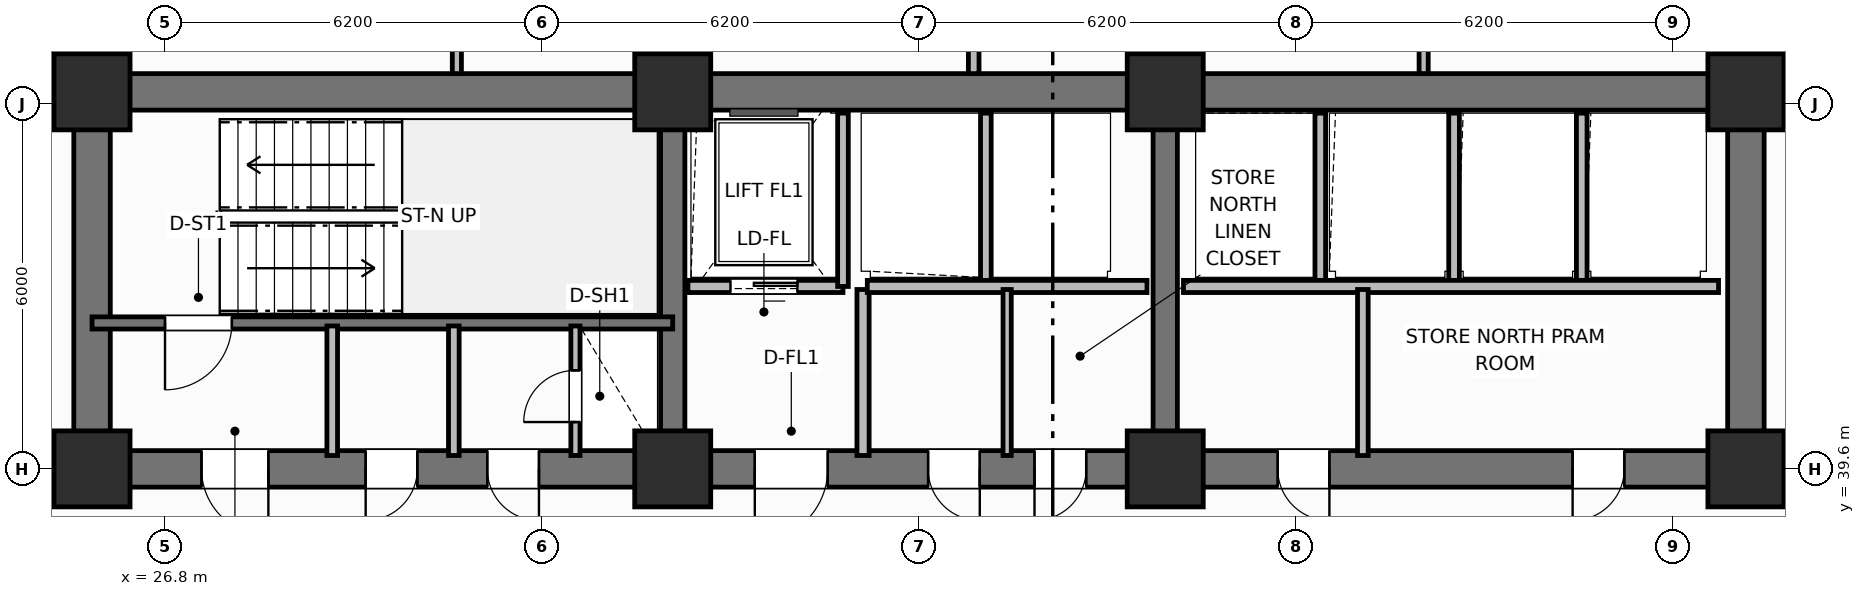
"""IFC4 building model, lengths in metres.
Left out: names, types, materials, properties, quantities, classifications, styles, units other than length and angle.
Written with IfcOpenShell. Run it as: python <this file> out.ifc"""

import sys

from ifc_helpers import new_model, si_unit, direction, frame, frame_2d, origin, origin_2d, place, context, subcontext, project, spatial, rectangle, extrude, element, fill, save


model = new_model("IFC4")
c1 = context("Model", 3, precision=1e-05, world=origin(), true_north=direction((0.0, 1.0)))
c2 = subcontext(c1, "Body", "Model", "MODEL_VIEW")
j1 = project(units=[si_unit("LENGTHUNIT", "METRE"), si_unit("PLANEANGLEUNIT", "RADIAN")], contexts=[c1])
p1 = place(None, origin())
s1 = spatial("IfcSite", under=j1, at=p1, CompositionType="ELEMENT")
p2 = place(p1, origin())
s2 = spatial("IfcBuilding", under=s1, at=p2, CompositionType="ELEMENT")
p3 = place(p2, frame((0.0, 0.0, 39.9)))
s3 = spatial("IfcBuildingStorey", under=s2, at=p3, CompositionType="ELEMENT", Elevation=39.9)
p4 = place(p3, frame((25.6, 45.8, 0.0), z_axis=(0.0, 0.0, 1.0), x_axis=(1.0, 0.0, 0.0)))
e1 = element("IfcWall", 1, at=p4, inside=s3, PredefinedType="SHEAR", context=c2, shape_type="SweptSolid", body=[
    extrude(rectangle(XDim=27.2, YDim=0.6, at=frame_2d((13.6, 0.0))), origin(), (0.0, 0.0, 1.0), 3.7),
])
for number, where, z_axis, x_axis in (
    (2, (25.6, 39.9, 0.0), (0.0, 0.0, 1.0), (0.0, 1.0, 0.0)),
    (3, (52.8, 39.9, 0.0), (0.0, 0.0, 1.0), (0.0, 1.0, 0.0)),
):
    element("IfcWall", number, at=place(p3, frame(where, z_axis=z_axis, x_axis=x_axis)), inside=s3, PredefinedType="SHEAR", context=c2, shape_type="SweptSolid", body=[
        extrude(rectangle(XDim=5.6, YDim=0.6, at=frame_2d((2.8, 0.0))), origin(), (0.0, 0.0, 1.0), 3.7),
    ])
p5 = place(p3, frame((52.8, 39.6, 0.0), z_axis=(0.0, 0.0, 1.0), x_axis=(-1.0, 0.0, 0.0)))
e4 = element("IfcWall", 4, at=p5, inside=s3, PredefinedType="SHEAR", context=c2, shape_type="SweptSolid", body=[
    extrude(rectangle(XDim=27.2, YDim=0.6, at=frame_2d((13.6, 0.0))), origin(), (0.0, 0.0, 1.0), 3.7),
])
p6 = place(p5, frame((24.3, 0.0, 0.0)))
e5 = element("IfcOpeningElement", 5, at=p6, cuts=e4, PredefinedType="OPENING", context=c2, shape_type="SweptSolid", body=[
    extrude(rectangle(XDim=1.1, YDim=2.15, at=frame_2d((0.55, 1.075))), frame((0.0, 0.31, 0.0), z_axis=(0.0, -1.0, 0.0), x_axis=(1.0, 0.0, 0.0)), (0.0, 0.0, 1.0), 0.62),
])
p7 = place(p5, frame((21.85, 0.0, 0.0)))
e6 = element("IfcOpeningElement", 6, at=p7, cuts=e4, PredefinedType="OPENING", context=c2, shape_type="SweptSolid", body=[
    extrude(rectangle(XDim=0.85, YDim=2.1, at=frame_2d((0.425, 1.05))), frame((0.0, 0.31, 0.0), z_axis=(0.0, -1.0, 0.0), x_axis=(1.0, 0.0, 0.0)), (0.0, 0.0, 1.0), 0.62),
])
p8 = place(p5, frame((19.85, 0.0, 0.0)))
e7 = element("IfcOpeningElement", 7, at=p8, cuts=e4, PredefinedType="OPENING", context=c2, shape_type="SweptSolid", body=[
    extrude(rectangle(XDim=0.85, YDim=2.1, at=frame_2d((0.425, 1.05))), frame((0.0, 0.31, 0.0), z_axis=(0.0, -1.0, 0.0), x_axis=(1.0, 0.0, 0.0)), (0.0, 0.0, 1.0), 0.62),
])
p9 = place(p5, frame((15.1, 0.0, 0.0)))
e8 = element("IfcOpeningElement", 8, at=p9, cuts=e4, PredefinedType="OPENING", context=c2, shape_type="SweptSolid", body=[
    extrude(rectangle(XDim=1.2, YDim=2.15, at=frame_2d((0.6, 1.075))), frame((0.0, 0.31, 0.0), z_axis=(0.0, -1.0, 0.0), x_axis=(1.0, 0.0, 0.0)), (0.0, 0.0, 1.0), 0.62),
])
p10 = place(p5, frame((12.6, 0.0, 0.0)))
e9 = element("IfcOpeningElement", 9, at=p10, cuts=e4, PredefinedType="OPENING", context=c2, shape_type="SweptSolid", body=[
    extrude(rectangle(XDim=0.85, YDim=2.1, at=frame_2d((0.425, 1.05))), frame((0.0, 0.31, 0.0), z_axis=(0.0, -1.0, 0.0), x_axis=(1.0, 0.0, 0.0)), (0.0, 0.0, 1.0), 0.62),
])
p11 = place(p5, frame((10.85, 0.0, 0.0)))
e10 = element("IfcOpeningElement", 10, at=p11, cuts=e4, PredefinedType="OPENING", context=c2, shape_type="SweptSolid", body=[
    extrude(rectangle(XDim=0.85, YDim=2.1, at=frame_2d((0.425, 1.05))), frame((0.0, 0.31, 0.0), z_axis=(0.0, -1.0, 0.0), x_axis=(1.0, 0.0, 0.0)), (0.0, 0.0, 1.0), 0.62),
])
p12 = place(p5, frame((6.85, 0.0, 0.0)))
e11 = element("IfcOpeningElement", 11, at=p12, cuts=e4, PredefinedType="OPENING", context=c2, shape_type="SweptSolid", body=[
    extrude(rectangle(XDim=0.85, YDim=2.1, at=frame_2d((0.425, 1.05))), frame((0.0, 0.31, 0.0), z_axis=(0.0, -1.0, 0.0), x_axis=(1.0, 0.0, 0.0)), (0.0, 0.0, 1.0), 0.62),
])
p13 = place(p5, frame((2.0, 0.0, 0.0)))
e12 = element("IfcOpeningElement", 12, at=p13, cuts=e4, PredefinedType="OPENING", context=c2, shape_type="SweptSolid", body=[
    extrude(rectangle(XDim=0.85, YDim=2.1, at=frame_2d((0.425, 1.05))), frame((0.0, 0.31, 0.0), z_axis=(0.0, -1.0, 0.0), x_axis=(1.0, 0.0, 0.0)), (0.0, 0.0, 1.0), 0.62),
])
for number, where, z_axis, x_axis in (
    (13, (35.15, 39.9, 0.0), (0.0, 0.0, 1.0), (0.0, 1.0, 0.0)),
    (14, (43.25, 39.9, 0.0), (0.0, 0.0, 1.0), (0.0, 1.0, 0.0)),
):
    element("IfcWall", number, at=place(p3, frame(where, z_axis=z_axis, x_axis=x_axis)), inside=s3, PredefinedType="SHEAR", context=c2, shape_type="SweptSolid", body=[
        extrude(rectangle(XDim=5.6, YDim=0.4, at=frame_2d((2.8, 0.0))), origin(), (0.0, 0.0, 1.0), 3.7),
    ])
for number, where, z_axis, x_axis in (
    (15, (25.6, 39.6, 0.0), (0.0, 0.0, 1.0), (1.0, 0.0, 0.0)),
    (16, (25.6, 45.8, 0.0), (0.0, 0.0, 1.0), (1.0, 0.0, 0.0)),
    (17, (35.15, 39.6, 0.0), (0.0, 0.0, 1.0), (1.0, 0.0, 0.0)),
    (18, (35.15, 45.8, 0.0), (0.0, 0.0, 1.0), (1.0, 0.0, 0.0)),
    (19, (43.25, 39.6, 0.0), (0.0, 0.0, 1.0), (1.0, 0.0, 0.0)),
    (20, (43.25, 45.8, 0.0), (0.0, 0.0, 1.0), (1.0, 0.0, 0.0)),
    (21, (52.8, 39.6, 0.0), (0.0, 0.0, 1.0), (1.0, 0.0, 0.0)),
    (22, (52.8, 45.8, 0.0), (0.0, 0.0, 1.0), (1.0, 0.0, 0.0)),
):
    element("IfcColumn", number, at=place(p3, frame(where, z_axis=z_axis, x_axis=x_axis)), inside=s3, PredefinedType="COLUMN", context=c2, shape_type="SweptSolid", body=[
        extrude(rectangle(XDim=1.25, YDim=1.25, at=origin_2d()), origin(), (0.0, 0.0, 1.0), 3.7),
    ])
p14 = place(p3, frame((35.15, 42.0, 0.0), z_axis=(0.0, 0.0, 1.0), x_axis=(-1.0, 0.0, 0.0)))
e23 = element("IfcWall", 23, at=p14, inside=s3, PredefinedType="SHEAR", context=c2, shape_type="SweptSolid", body=[
    extrude(rectangle(XDim=9.55, YDim=0.2, at=frame_2d((4.775, 0.0))), origin(), (0.0, 0.0, 1.0), 3.7),
])
p15 = place(p14, frame((7.25, 0.0, 0.0)))
e24 = element("IfcOpeningElement", 24, at=p15, cuts=e23, PredefinedType="OPENING", context=c2, shape_type="SweptSolid", body=[
    extrude(rectangle(XDim=1.1, YDim=2.15, at=frame_2d((0.55, 1.075))), frame((0.0, 0.11, 0.0), z_axis=(0.0, -1.0, 0.0), x_axis=(1.0, 0.0, 0.0)), (0.0, 0.0, 1.0), 0.22),
])
p16 = place(p3, frame((33.55, 39.82, 0.0), z_axis=(0.0, 0.0, 1.0), x_axis=(0.0, 1.0, 0.0)))
e25 = element("IfcWall", 25, at=p16, inside=s3, PredefinedType="PARTITIONING", context=c2, shape_type="SweptSolid", body=[
    extrude(rectangle(XDim=2.13, YDim=0.15, at=frame_2d((1.065, 0.0))), origin(), (0.0, 0.0, 1.0), 2.53),
])
p17 = place(p16, frame((0.55, 0.0, 0.0)))
e26 = element("IfcOpeningElement", 26, at=p17, cuts=e25, PredefinedType="OPENING", context=c2, shape_type="SweptSolid", body=[
    extrude(rectangle(XDim=0.85, YDim=2.05, at=frame_2d((0.425, 1.025))), frame((0.0, 0.085, 0.0), z_axis=(0.0, -1.0, 0.0), x_axis=(1.0, 0.0, 0.0)), (0.0, 0.0, 1.0), 0.17),
])
for number, where, z_axis, x_axis in (
    (27, (29.55, 39.82, 0.0), (0.0, 0.0, 1.0), (0.0, 1.0, 0.0)),
    (28, (31.55, 39.82, 0.0), (0.0, 0.0, 1.0), (0.0, 1.0, 0.0)),
):
    element("IfcWall", number, at=place(p3, frame(where, z_axis=z_axis, x_axis=x_axis)), inside=s3, PredefinedType="PARTITIONING", context=c2, shape_type="SweptSolid", body=[
        extrude(rectangle(XDim=2.13, YDim=0.175, at=frame_2d((1.065, 0.0))), origin(), (0.0, 0.0, 1.0), 2.53),
    ])
p18 = place(p3, frame((37.95, 42.6, 0.0), z_axis=(0.0, 0.0, 1.0), x_axis=(-1.0, 0.0, 0.0)))
e29 = element("IfcWall", 29, at=p18, inside=s3, PredefinedType="PARTITIONING", context=c2, shape_type="SweptSolid", body=[
    extrude(rectangle(XDim=2.55, YDim=0.2, at=frame_2d((1.275, 0.0))), origin(), (0.0, 0.0, 1.0), 2.3),
])
p19 = place(p18, frame((0.75, 0.0, 0.0)))
e30 = element("IfcOpeningElement", 30, at=p19, cuts=e29, PredefinedType="OPENING", context=c2, shape_type="SweptSolid", body=[
    extrude(rectangle(XDim=1.1, YDim=2.15, at=frame_2d((0.55, 1.075))), frame((0.0, 0.11, 0.0), z_axis=(0.0, -1.0, 0.0), x_axis=(1.0, 0.0, 0.0)), (0.0, 0.0, 1.0), 0.22),
])
p20 = place(p3, frame((37.95, 42.6, 0.0), z_axis=(0.0, 0.0, 1.0), x_axis=(0.0, 1.0, 0.0)))
e31 = element("IfcWall", 31, at=p20, inside=s3, PredefinedType="PARTITIONING", context=c2, shape_type="SweptSolid", body=[
    extrude(rectangle(XDim=2.85, YDim=0.175, at=frame_2d((1.425, 0.0))), origin(), (0.0, 0.0, 1.0), 2.53),
])
p21 = place(p3, frame((38.28, 39.82, 0.0), z_axis=(0.0, 0.0, 1.0), x_axis=(0.0, 1.0, 0.0)))
e32 = element("IfcWall", 32, at=p21, inside=s3, PredefinedType="PARTITIONING", context=c2, shape_type="SweptSolid", body=[
    extrude(rectangle(XDim=2.73, YDim=0.2, at=frame_2d((1.365, 0.0))), origin(), (0.0, 0.0, 1.0), 2.53),
])
p22 = place(p3, frame((40.3, 42.65, 0.0), z_axis=(0.0, 0.0, 1.0), x_axis=(0.0, 1.0, 0.0)))
e33 = element("IfcWall", 33, at=p22, inside=s3, PredefinedType="PARTITIONING", context=c2, shape_type="SweptSolid", body=[
    extrude(rectangle(XDim=2.8, YDim=0.175, at=frame_2d((1.4, 0.0))), origin(), (0.0, 0.0, 1.0), 2.53),
])
p23 = place(p3, frame((42.95, 42.6, 0.0), z_axis=(0.0, 0.0, 1.0), x_axis=(-1.0, 0.0, 0.0)))
e34 = element("IfcWall", 34, at=p23, inside=s3, PredefinedType="PARTITIONING", context=c2, shape_type="SweptSolid", body=[
    extrude(rectangle(XDim=4.6, YDim=0.2, at=frame_2d((2.3, 0.0))), origin(), (0.0, 0.0, 1.0), 2.3),
])
p24 = place(p3, frame((40.65, 39.82, 0.0), z_axis=(0.0, 0.0, 1.0), x_axis=(0.0, 1.0, 0.0)))
e35 = element("IfcWall", 35, at=p24, inside=s3, PredefinedType="PARTITIONING", context=c2, shape_type="SweptSolid", body=[
    extrude(rectangle(XDim=2.73, YDim=0.135, at=frame_2d((1.365, 0.0))), origin(), (0.0, 0.0, 1.0), 2.53),
])
for number, where, z_axis, x_axis in (
    (36, (45.8, 42.65, 0.0), (0.0, 0.0, 1.0), (0.0, 1.0, 0.0)),
    (37, (48.0, 42.65, 0.0), (0.0, 0.0, 1.0), (0.0, 1.0, 0.0)),
    (38, (50.1, 42.65, 0.0), (0.0, 0.0, 1.0), (0.0, 1.0, 0.0)),
):
    element("IfcWall", number, at=place(p3, frame(where, z_axis=z_axis, x_axis=x_axis)), inside=s3, PredefinedType="PARTITIONING", context=c2, shape_type="SweptSolid", body=[
        extrude(rectangle(XDim=2.8, YDim=0.175, at=frame_2d((1.4, 0.0))), origin(), (0.0, 0.0, 1.0), 2.53),
    ])
p25 = place(p3, frame((52.35, 42.6, 0.0), z_axis=(0.0, 0.0, 1.0), x_axis=(-1.0, 0.0, 0.0)))
e39 = element("IfcWall", 39, at=p25, inside=s3, PredefinedType="PARTITIONING", context=c2, shape_type="SweptSolid", body=[
    extrude(rectangle(XDim=8.8, YDim=0.2, at=frame_2d((4.4, 0.0))), origin(), (0.0, 0.0, 1.0), 2.53),
])
p26 = place(p3, frame((46.5, 39.82, 0.0), z_axis=(0.0, 0.0, 1.0), x_axis=(0.0, 1.0, 0.0)))
e40 = element("IfcWall", 40, at=p26, inside=s3, PredefinedType="PARTITIONING", context=c2, shape_type="SweptSolid", body=[
    extrude(rectangle(XDim=2.73, YDim=0.175, at=frame_2d((1.365, 0.0))), origin(), (0.0, 0.0, 1.0), 2.53),
])
p27 = place(p3, frame((31.6, 46.1, 0.0), z_axis=(0.0, 0.0, 1.0), x_axis=(0.0, 1.0, 0.0)))
e41 = element("IfcWall", 41, at=p27, inside=s3, PredefinedType="PARTITIONING", context=c2, shape_type="SweptSolid", body=[
    extrude(rectangle(XDim=5.33, YDim=0.15, at=frame_2d((2.665, 0.0))), origin(), (0.0, 0.0, 1.0), 2.53),
])
p28 = place(p27, frame((0.85, 0.0, 0.0)))
e42 = element("IfcOpeningElement", 42, at=p28, cuts=e41, PredefinedType="OPENING", context=c2, shape_type="SweptSolid", body=[
    extrude(rectangle(XDim=0.9, YDim=2.1, at=frame_2d((0.45, 1.05))), frame((0.0, 0.085, 0.0), z_axis=(0.0, -1.0, 0.0), x_axis=(1.0, 0.0, 0.0)), (0.0, 0.0, 1.0), 0.17),
])
p29 = place(p3, frame((40.1, 46.1, 0.0), z_axis=(0.0, 0.0, 1.0), x_axis=(0.0, 1.0, 0.0)))
e43 = element("IfcWall", 43, at=p29, inside=s3, PredefinedType="PARTITIONING", context=c2, shape_type="SweptSolid", body=[
    extrude(rectangle(XDim=5.33, YDim=0.175, at=frame_2d((2.665, 0.0))), origin(), (0.0, 0.0, 1.0), 2.53),
])
p30 = place(p3, frame((47.5, 46.1, 0.0), z_axis=(0.0, 0.0, 1.0), x_axis=(0.0, 1.0, 0.0)))
e44 = element("IfcWall", 44, at=p30, inside=s3, PredefinedType="PARTITIONING", context=c2, shape_type="SweptSolid", body=[
    extrude(rectangle(XDim=5.33, YDim=0.15, at=frame_2d((2.665, 0.0))), origin(), (0.0, 0.0, 1.0), 2.53),
])
p31 = place(p30, frame((0.85, 0.0, 0.0)))
e45 = element("IfcOpeningElement", 45, at=p31, cuts=e44, PredefinedType="OPENING", context=c2, shape_type="SweptSolid", body=[
    extrude(rectangle(XDim=0.9, YDim=2.1, at=frame_2d((0.45, 1.05))), frame((0.0, 0.085, 0.0), z_axis=(0.0, -1.0, 0.0), x_axis=(1.0, 0.0, 0.0)), (0.0, 0.0, 1.0), 0.17),
])
p32 = place(p3, frame((25.4, 46.1, 0.0), z_axis=(0.0, 0.0, 1.0), x_axis=(0.0, 1.0, 0.0)))
e46 = element("IfcWall", 46, at=p32, inside=s3, PredefinedType="PARTITIONING", context=c2, shape_type="SweptSolid", body=[
    extrude(rectangle(XDim=4.38, YDim=0.2, at=frame_2d((2.19, 0.0))), origin(), (0.0, 0.0, 1.0), 2.53),
])
p33 = place(p32, frame((1.05, 0.0, 0.0)))
e47 = element("IfcOpeningElement", 47, at=p33, cuts=e46, PredefinedType="OPENING", context=c2, shape_type="SweptSolid", body=[
    extrude(rectangle(XDim=0.9, YDim=2.1, at=frame_2d((0.45, 1.05))), frame((0.0, 0.11, 0.0), z_axis=(0.0, -1.0, 0.0), x_axis=(1.0, 0.0, 0.0)), (0.0, 0.0, 1.0), 0.22),
])
p34 = place(p3, frame((53.0, 46.1, 0.0), z_axis=(0.0, 0.0, 1.0), x_axis=(0.0, 1.0, 0.0)))
e48 = element("IfcWall", 48, at=p34, inside=s3, PredefinedType="PARTITIONING", context=c2, shape_type="SweptSolid", body=[
    extrude(rectangle(XDim=4.38, YDim=0.2, at=frame_2d((2.19, 0.0))), origin(), (0.0, 0.0, 1.0), 2.53),
])
p35 = place(p34, frame((1.05, 0.0, 0.0)))
e49 = element("IfcOpeningElement", 49, at=p35, cuts=e48, PredefinedType="OPENING", context=c2, shape_type="SweptSolid", body=[
    extrude(rectangle(XDim=0.9, YDim=2.1, at=frame_2d((0.45, 1.05))), frame((0.0, 0.11, 0.0), z_axis=(0.0, -1.0, 0.0), x_axis=(1.0, 0.0, 0.0)), (0.0, 0.0, 1.0), 0.22),
])
p36 = place(p15, origin())
e50 = element("IfcDoor", 50, at=p36, inside=s3, OperationType="SINGLE_SWING_RIGHT", PredefinedType="DOOR", context=c2, shape_type="SweptSolid", body=[
    extrude(rectangle(XDim=1.1, YDim=2.15, at=frame_2d((0.55, 1.075))), frame((0.0, 0.025, 0.0), z_axis=(0.0, -1.0, 0.0), x_axis=(1.0, 0.0, 0.0)), (0.0, 0.0, 1.0), 0.05),
])
fill(e24, e50)
p37 = place(p17, origin())
e51 = element("IfcDoor", 51, at=p37, inside=s3, OperationType="SINGLE_SWING_LEFT", PredefinedType="TRAPDOOR", context=c2, shape_type="SweptSolid", body=[
    extrude(rectangle(XDim=0.85, YDim=2.05, at=frame_2d((0.425, 1.025))), frame((0.0, 0.025, 0.0), z_axis=(0.0, -1.0, 0.0), x_axis=(1.0, 0.0, 0.0)), (0.0, 0.0, 1.0), 0.05),
])
fill(e26, e51)
p38 = place(p19, origin())
e52 = element("IfcDoor", 52, at=p38, inside=s3, OperationType="SLIDING_TO_LEFT", PredefinedType="DOOR", context=c2, shape_type="SweptSolid", body=[
    extrude(rectangle(XDim=1.1, YDim=2.15, at=frame_2d((0.55, 1.075))), frame((0.0, 0.025, 0.0), z_axis=(0.0, -1.0, 0.0), x_axis=(1.0, 0.0, 0.0)), (0.0, 0.0, 1.0), 0.05),
])
fill(e30, e52)
p39 = place(p6, origin())
e53 = element("IfcDoor", 53, at=p39, inside=s3, OperationType="SINGLE_SWING_LEFT", PredefinedType="DOOR", context=c2, shape_type="SweptSolid", body=[
    extrude(rectangle(XDim=1.1, YDim=2.15, at=frame_2d((0.55, 1.075))), frame((0.0, 0.025, 0.0), z_axis=(0.0, -1.0, 0.0), x_axis=(1.0, 0.0, 0.0)), (0.0, 0.0, 1.0), 0.05),
])
fill(e5, e53)
p40 = place(p7, origin())
e54 = element("IfcDoor", 54, at=p40, inside=s3, OperationType="SINGLE_SWING_RIGHT", PredefinedType="DOOR", context=c2, shape_type="SweptSolid", body=[
    extrude(rectangle(XDim=0.85, YDim=2.1, at=frame_2d((0.425, 1.05))), frame((0.0, 0.025, 0.0), z_axis=(0.0, -1.0, 0.0), x_axis=(1.0, 0.0, 0.0)), (0.0, 0.0, 1.0), 0.05),
])
fill(e6, e54)
p41 = place(p8, origin())
e55 = element("IfcDoor", 55, at=p41, inside=s3, OperationType="SINGLE_SWING_LEFT", PredefinedType="DOOR", context=c2, shape_type="SweptSolid", body=[
    extrude(rectangle(XDim=0.85, YDim=2.1, at=frame_2d((0.425, 1.05))), frame((0.0, 0.025, 0.0), z_axis=(0.0, -1.0, 0.0), x_axis=(1.0, 0.0, 0.0)), (0.0, 0.0, 1.0), 0.05),
])
fill(e7, e55)
p42 = place(p9, origin())
e56 = element("IfcDoor", 56, at=p42, inside=s3, OperationType="SINGLE_SWING_RIGHT", PredefinedType="DOOR", context=c2, shape_type="SweptSolid", body=[
    extrude(rectangle(XDim=1.2, YDim=2.15, at=frame_2d((0.6, 1.075))), frame((0.0, 0.025, 0.0), z_axis=(0.0, -1.0, 0.0), x_axis=(1.0, 0.0, 0.0)), (0.0, 0.0, 1.0), 0.05),
])
fill(e8, e56)
p43 = place(p10, origin())
e57 = element("IfcDoor", 57, at=p43, inside=s3, OperationType="SINGLE_SWING_LEFT", PredefinedType="DOOR", context=c2, shape_type="SweptSolid", body=[
    extrude(rectangle(XDim=0.85, YDim=2.1, at=frame_2d((0.425, 1.05))), frame((0.0, 0.025, 0.0), z_axis=(0.0, -1.0, 0.0), x_axis=(1.0, 0.0, 0.0)), (0.0, 0.0, 1.0), 0.05),
])
fill(e9, e57)
p44 = place(p11, origin())
e58 = element("IfcDoor", 58, at=p44, inside=s3, OperationType="SINGLE_SWING_RIGHT", PredefinedType="DOOR", context=c2, shape_type="SweptSolid", body=[
    extrude(rectangle(XDim=0.85, YDim=2.1, at=frame_2d((0.425, 1.05))), frame((0.0, 0.025, 0.0), z_axis=(0.0, -1.0, 0.0), x_axis=(1.0, 0.0, 0.0)), (0.0, 0.0, 1.0), 0.05),
])
fill(e10, e58)
p45 = place(p12, origin())
e59 = element("IfcDoor", 59, at=p45, inside=s3, OperationType="SINGLE_SWING_LEFT", PredefinedType="DOOR", context=c2, shape_type="SweptSolid", body=[
    extrude(rectangle(XDim=0.85, YDim=2.1, at=frame_2d((0.425, 1.05))), frame((0.0, 0.025, 0.0), z_axis=(0.0, -1.0, 0.0), x_axis=(1.0, 0.0, 0.0)), (0.0, 0.0, 1.0), 0.05),
])
fill(e11, e59)
p46 = place(p13, origin())
e60 = element("IfcDoor", 60, at=p46, inside=s3, OperationType="SINGLE_SWING_RIGHT", PredefinedType="DOOR", context=c2, shape_type="SweptSolid", body=[
    extrude(rectangle(XDim=0.85, YDim=2.1, at=frame_2d((0.425, 1.05))), frame((0.0, 0.025, 0.0), z_axis=(0.0, -1.0, 0.0), x_axis=(1.0, 0.0, 0.0)), (0.0, 0.0, 1.0), 0.05),
])
fill(e12, e60)
save(model, sys.argv[1])
